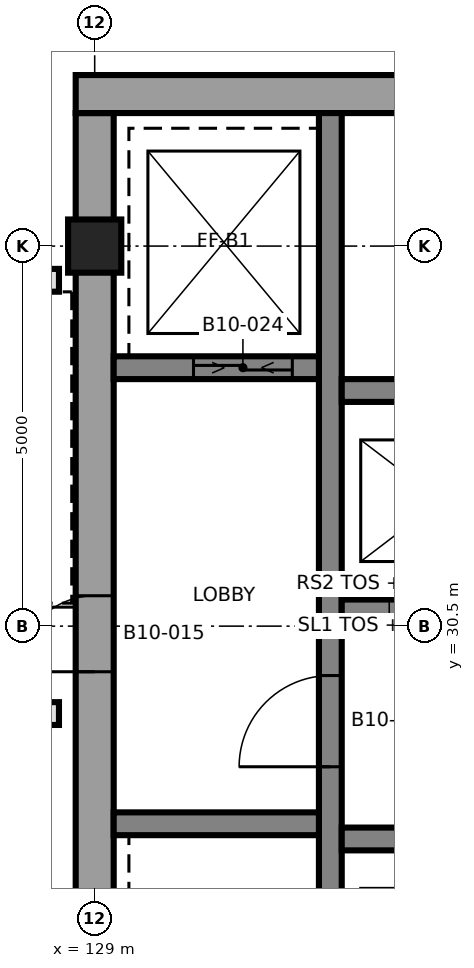
"""IFC4 building model, lengths in metres.
Left out: names, types, materials, properties, quantities, classifications, styles, units other than length and angle.
Written with IfcOpenShell. Run it as: python <this file> out.ifc"""

import sys

from ifc_helpers import new_model, si_unit, direction, frame, frame_2d, origin, origin_2d, place, context, subcontext, project, spatial, rectangle, extrude, element, fill, save


model = new_model("IFC4")
c1 = context("Model", 3, precision=1e-05, world=origin(), true_north=direction((0.0, 1.0)))
c2 = subcontext(c1, "Body", "Model", "MODEL_VIEW")
j1 = project(units=[si_unit("LENGTHUNIT", "METRE"), si_unit("PLANEANGLEUNIT", "RADIAN")], contexts=[c1])
p1 = place(None, origin())
s1 = spatial("IfcSite", under=j1, at=p1, CompositionType="ELEMENT")
p2 = place(p1, origin())
s2 = spatial("IfcBuilding", under=s1, at=p2, CompositionType="ELEMENT")
p3 = place(p2, frame((0.0, 0.0, 101.9)))
s3 = spatial("IfcBuildingStorey", under=s2, at=p3, CompositionType="ELEMENT", Elevation=101.9)
p4 = place(p3, frame((129.0, 24.75, 0.0), z_axis=(0.0, 0.0, 1.0), x_axis=(0.0, 1.0, 0.0)))
e1 = element("IfcWall", 1, at=p4, inside=s3, PredefinedType="SHEAR", context=c2, shape_type="SweptSolid", body=[
    extrude(rectangle(XDim=12.5, YDim=0.5, at=frame_2d((6.25, 0.0))), origin(), (0.0, 0.0, 1.0), 3.7),
])
p5 = place(p4, frame((5.15, 0.0, 0.0)))
e2 = element("IfcOpeningElement", 2, at=p5, cuts=e1, PredefinedType="OPENING", context=c2, shape_type="SweptSolid", body=[
    extrude(rectangle(XDim=1.0, YDim=2.1, at=frame_2d((0.5, 1.05))), frame((0.0, 0.26, 0.0), z_axis=(0.0, -1.0, 0.0), x_axis=(1.0, 0.0, 0.0)), (0.0, 0.0, 1.0), 0.52),
])
p6 = place(p3, frame((128.75, 37.5, 0.0), z_axis=(0.0, 0.0, 1.0), x_axis=(1.0, 0.0, 0.0)))
e3 = element("IfcWall", 3, at=p6, inside=s3, PredefinedType="SHEAR", context=c2, shape_type="SweptSolid", body=[
    extrude(rectangle(XDim=15.0, YDim=0.5, at=frame_2d((7.5, 0.0))), origin(), (0.0, 0.0, 1.0), 3.7),
])
p7 = place(p6, frame((9.65, 0.0, 0.0)))
e4 = element("IfcOpeningElement", 4, at=p7, cuts=e3, PredefinedType="OPENING", context=c2, shape_type="SweptSolid", body=[
    extrude(rectangle(XDim=1.5, YDim=2.1, at=frame_2d((0.75, 1.05))), frame((0.0, 0.26, 0.0), z_axis=(0.0, -1.0, 0.0), x_axis=(1.0, 0.0, 0.0)), (0.0, 0.0, 1.0), 0.52),
])
p8 = place(p6, frame((12.85, 0.0, 0.0)))
e5 = element("IfcOpeningElement", 5, at=p8, cuts=e3, PredefinedType="OPENING", context=c2, shape_type="SweptSolid", body=[
    extrude(rectangle(XDim=0.9, YDim=2.1, at=frame_2d((0.45, 1.05))), frame((0.0, 0.26, 0.0), z_axis=(0.0, -1.0, 0.0), x_axis=(1.0, 0.0, 0.0)), (0.0, 0.0, 1.0), 0.52),
])
p9 = place(p6, frame((4.3, 0.0, 0.0)))
e6 = element("IfcOpeningElement", 6, at=p9, cuts=e3, PredefinedType="OPENING", context=c2, shape_type="SweptSolid", body=[
    extrude(rectangle(XDim=0.9, YDim=2.1, at=frame_2d((0.45, 1.05))), frame((0.0, 0.26, 0.0), z_axis=(0.0, -1.0, 0.0), x_axis=(1.0, 0.0, 0.0)), (0.0, 0.0, 1.0), 0.52),
])
p10 = place(p6, frame((7.2, 0.0, 0.0)))
e7 = element("IfcOpeningElement", 7, at=p10, cuts=e3, PredefinedType="OPENING", context=c2, shape_type="SweptSolid", body=[
    extrude(rectangle(XDim=0.9, YDim=2.1, at=frame_2d((0.45, 1.05))), frame((0.0, 0.26, 0.0), z_axis=(0.0, -1.0, 0.0), x_axis=(1.0, 0.0, 0.0)), (0.0, 0.0, 1.0), 0.52),
])
p11 = place(p3, frame((132.1, 24.75, 0.0), z_axis=(0.0, 0.0, 1.0), x_axis=(0.0, 1.0, 0.0)))
e8 = element("IfcWall", 8, at=p11, inside=s3, PredefinedType="SHEAR", context=c2, shape_type="SweptSolid", body=[
    extrude(rectangle(XDim=12.5, YDim=0.3, at=frame_2d((6.25, 0.0))), origin(), (0.0, 0.0, 1.0), 3.7),
])
p12 = place(p11, frame((3.9, 0.0, 0.0)))
e9 = element("IfcOpeningElement", 9, at=p12, cuts=e8, PredefinedType="OPENING", context=c2, shape_type="SweptSolid", body=[
    extrude(rectangle(XDim=1.2, YDim=2.1, at=frame_2d((0.6, 1.05))), frame((0.0, 0.16, 0.0), z_axis=(0.0, -1.0, 0.0), x_axis=(1.0, 0.0, 0.0)), (0.0, 0.0, 1.0), 0.32),
])
p13 = place(p3, frame((132.25, 27.7, 0.0), z_axis=(0.0, 0.0, 1.0), x_axis=(1.0, 0.0, 0.0)))
e10 = element("IfcWall", 10, at=p13, inside=s3, PredefinedType="SHEAR", context=c2, shape_type="SweptSolid", body=[
    extrude(rectangle(XDim=5.5, YDim=0.3, at=frame_2d((2.75, 0.0))), origin(), (0.0, 0.0, 1.0), 3.7),
])
p14 = place(p13, frame((0.9, 0.0, 0.0)))
e11 = element("IfcOpeningElement", 11, at=p14, cuts=e10, PredefinedType="OPENING", context=c2, shape_type="SweptSolid", body=[
    extrude(rectangle(XDim=1.1, YDim=2.4, at=frame_2d((0.55, 1.2))), frame((0.0, 0.16, 0.0), z_axis=(0.0, -1.0, 0.0), x_axis=(1.0, 0.0, 0.0)), (0.0, 0.0, 1.0), 0.32),
])
p15 = place(p13, frame((3.8, 0.0, 0.0)))
e12 = element("IfcOpeningElement", 12, at=p15, cuts=e10, PredefinedType="OPENING", context=c2, shape_type="SweptSolid", body=[
    extrude(rectangle(XDim=1.1, YDim=2.4, at=frame_2d((0.55, 1.2))), frame((0.0, 0.16, 0.0), z_axis=(0.0, -1.0, 0.0), x_axis=(1.0, 0.0, 0.0)), (0.0, 0.0, 1.0), 0.32),
])
p16 = place(p3, frame((132.25, 30.7, 0.0), z_axis=(0.0, 0.0, 1.0), x_axis=(1.0, 0.0, 0.0)))
e13 = element("IfcWall", 13, at=p16, inside=s3, PredefinedType="SHEAR", context=c2, shape_type="SweptSolid", body=[
    extrude(rectangle(XDim=5.5, YDim=0.3, at=frame_2d((2.75, 0.0))), origin(), (0.0, 0.0, 1.0), 3.7),
])
p17 = place(p16, frame((0.9, 0.0, 0.0)))
e14 = element("IfcOpeningElement", 14, at=p17, cuts=e13, PredefinedType="OPENING", context=c2, shape_type="SweptSolid", body=[
    extrude(rectangle(XDim=1.1, YDim=2.4, at=frame_2d((0.55, 1.2))), frame((0.0, 0.16, 0.0), z_axis=(0.0, -1.0, 0.0), x_axis=(1.0, 0.0, 0.0)), (0.0, 0.0, 1.0), 0.32),
])
p18 = place(p16, frame((3.8, 0.0, 0.0)))
e15 = element("IfcOpeningElement", 15, at=p18, cuts=e13, PredefinedType="OPENING", context=c2, shape_type="SweptSolid", body=[
    extrude(rectangle(XDim=1.1, YDim=2.4, at=frame_2d((0.55, 1.2))), frame((0.0, 0.16, 0.0), z_axis=(0.0, -1.0, 0.0), x_axis=(1.0, 0.0, 0.0)), (0.0, 0.0, 1.0), 0.32),
])
p19 = place(p3, frame((132.25, 33.6, 0.0), z_axis=(0.0, 0.0, 1.0), x_axis=(1.0, 0.0, 0.0)))
e16 = element("IfcWall", 16, at=p19, inside=s3, PredefinedType="SHEAR", context=c2, shape_type="SweptSolid", body=[
    extrude(rectangle(XDim=5.5, YDim=0.3, at=frame_2d((2.75, 0.0))), origin(), (0.0, 0.0, 1.0), 3.7),
])
p20 = place(p3, frame((129.25, 27.9, 0.0), z_axis=(0.0, 0.0, 1.0), x_axis=(1.0, 0.0, 0.0)))
e17 = element("IfcWall", 17, at=p20, inside=s3, PredefinedType="SHEAR", context=c2, shape_type="SweptSolid", body=[
    extrude(rectangle(XDim=2.7, YDim=0.3, at=frame_2d((1.35, 0.0))), origin(), (0.0, 0.0, 1.0), 3.7),
])
p21 = place(p3, frame((129.25, 33.9, 0.0), z_axis=(0.0, 0.0, 1.0), x_axis=(1.0, 0.0, 0.0)))
e18 = element("IfcWall", 18, at=p21, inside=s3, PredefinedType="SHEAR", context=c2, shape_type="SweptSolid", body=[
    extrude(rectangle(XDim=2.7, YDim=0.3, at=frame_2d((1.35, 0.0))), origin(), (0.0, 0.0, 1.0), 3.7),
])
p22 = place(p21, frame((1.05, 0.0, 0.0)))
e19 = element("IfcOpeningElement", 19, at=p22, cuts=e18, PredefinedType="OPENING", context=c2, shape_type="SweptSolid", body=[
    extrude(rectangle(XDim=1.3, YDim=2.4, at=frame_2d((0.65, 1.2))), frame((0.0, 0.16, 0.0), z_axis=(0.0, -1.0, 0.0), x_axis=(1.0, 0.0, 0.0)), (0.0, 0.0, 1.0), 0.32),
])
p23 = place(p3, frame((129.0, 35.5, 0.0), z_axis=(0.0, 0.0, 1.0), x_axis=(1.0, 0.0, 0.0)))
e20 = element("IfcColumn", 20, at=p23, inside=s3, PredefinedType="COLUMN", context=c2, shape_type="SweptSolid", body=[
    extrude(rectangle(XDim=0.7, YDim=0.7, at=origin_2d()), origin(), (0.0, 0.0, 1.0), 3.7),
])
p24 = place(p3, frame((125.7, 29.35, 0.0), z_axis=(0.0, 0.0, 1.0), x_axis=(1.0, 0.0, 0.0)))
e21 = element("IfcWall", 21, at=p24, inside=s3, PredefinedType="SOLIDWALL", context=c2, shape_type="SweptSolid", body=[
    extrude(rectangle(XDim=2.83, YDim=0.3, at=frame_2d((1.415, 0.0))), origin(), (0.0, 0.0, 1.0), 3.3),
])
p25 = place(p24, frame((0.975, 0.0, 0.0)))
e22 = element("IfcOpeningElement", 22, at=p25, cuts=e21, PredefinedType="OPENING", context=c2, shape_type="SweptSolid", body=[
    extrude(rectangle(XDim=1.2, YDim=2.1, at=frame_2d((0.6, 1.05))), frame((0.0, 0.16, 0.0), z_axis=(0.0, -1.0, 0.0), x_axis=(1.0, 0.0, 0.0)), (0.0, 0.0, 1.0), 0.32),
])
p26 = place(p3, frame((125.7, 35.05, 0.0), z_axis=(0.0, 0.0, 1.0), x_axis=(1.0, 0.0, 0.0)))
e23 = element("IfcWall", 23, at=p26, inside=s3, PredefinedType="SOLIDWALL", context=c2, shape_type="SweptSolid", body=[
    extrude(rectangle(XDim=2.83, YDim=0.3, at=frame_2d((1.415, 0.0))), origin(), (0.0, 0.0, 1.0), 3.3),
])
p27 = place(p12, origin())
e24 = element("IfcDoor", 24, at=p27, inside=s3, OperationType="SINGLE_SWING_LEFT", PredefinedType="DOOR", context=c2, shape_type="SweptSolid", body=[
    extrude(rectangle(XDim=1.2, YDim=2.1, at=frame_2d((0.6, 1.05))), frame((0.0, 0.025, 0.0), z_axis=(0.0, -1.0, 0.0), x_axis=(1.0, 0.0, 0.0)), (0.0, 0.0, 1.0), 0.05),
])
fill(e9, e24)
p28 = place(p5, origin())
e25 = element("IfcDoor", 25, at=p28, inside=s3, OperationType="SINGLE_SWING_RIGHT", PredefinedType="DOOR", context=c2, shape_type="SweptSolid", body=[
    extrude(rectangle(XDim=1.0, YDim=2.1, at=frame_2d((0.5, 1.05))), frame((0.0, 0.025, 0.0), z_axis=(0.0, -1.0, 0.0), x_axis=(1.0, 0.0, 0.0)), (0.0, 0.0, 1.0), 0.05),
])
fill(e2, e25)
p29 = place(p22, origin())
e26 = element("IfcDoor", 26, at=p29, inside=s3, OperationType="SLIDING_TO_LEFT", PredefinedType="DOOR", context=c2, shape_type="SweptSolid", body=[
    extrude(rectangle(XDim=1.3, YDim=2.4, at=frame_2d((0.65, 1.2))), frame((0.0, 0.025, 0.0), z_axis=(0.0, -1.0, 0.0), x_axis=(1.0, 0.0, 0.0)), (0.0, 0.0, 1.0), 0.05),
])
fill(e19, e26)
save(model, sys.argv[1])
